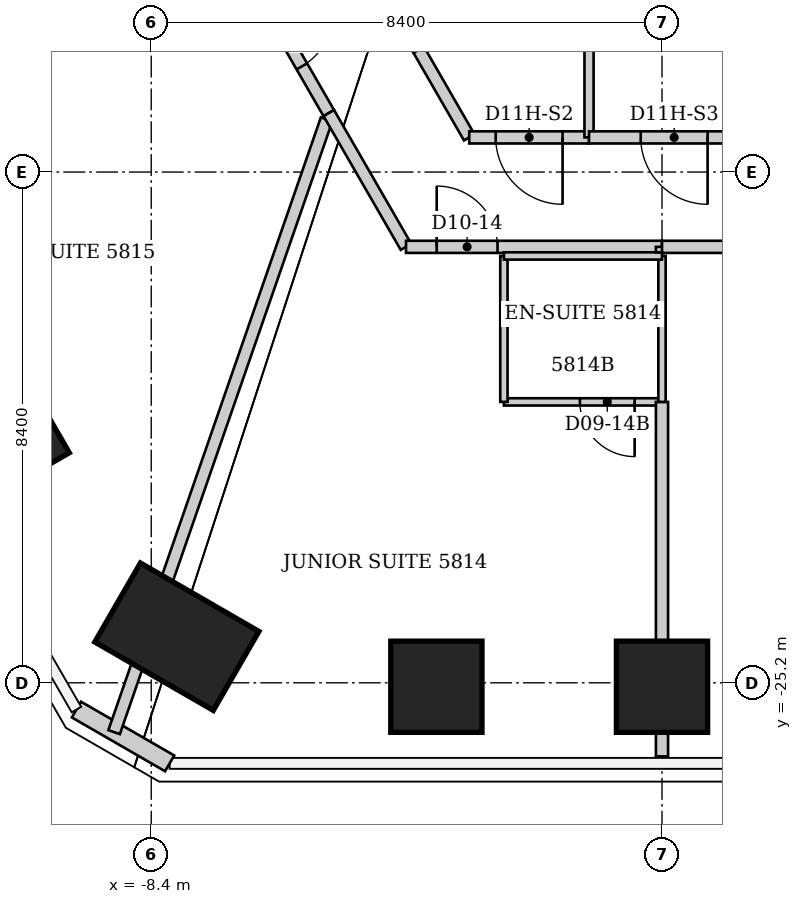
"""IFC4 building model, lengths in metres.
Left out: names, types, materials, properties, quantities, classifications, styles, units other than length and angle.
Written with IfcOpenShell. Run it as: python <this file> out.ifc"""

import sys

from ifc_helpers import new_model, si_unit, direction, frame, frame_2d, origin, origin_2d, place, context, subcontext, project, spatial, rectangle, extrude, element, fill, save


model = new_model("IFC4")
c1 = context("Model", 3, precision=1e-05, world=origin(), true_north=direction((0.0, 1.0)))
c2 = subcontext(c1, "Body", "Model", "MODEL_VIEW")
j1 = project(units=[si_unit("LENGTHUNIT", "METRE"), si_unit("PLANEANGLEUNIT", "RADIAN")], contexts=[c1])
p1 = place(None, origin())
s1 = spatial("IfcSite", under=j1, at=p1, CompositionType="ELEMENT")
p2 = place(p1, origin())
s2 = spatial("IfcBuilding", under=s1, at=p2, CompositionType="ELEMENT")
p3 = place(p2, frame((0.0, 0.0, 232.6)))
s3 = spatial("IfcBuildingStorey", under=s2, at=p3, CompositionType="ELEMENT", Elevation=232.6)
p4 = place(p3, frame((0.0, -25.265, -0.051), z_axis=(0.0, 0.068181275472, 0.997672949255), x_axis=(0.0, -0.997672949255, 0.068181275472)))
e1 = element("IfcColumn", 1, at=p4, inside=s3, PredefinedType="COLUMN", context=c2, shape_type="SweptSolid", body=[
    extrude(rectangle(XDim=1.5, YDim=1.5, at=origin_2d()), origin(), (0.0, 0.0, 1.0), 3.86),
])
p5 = place(p3, frame((-3.71, -25.265, -0.059), z_axis=(0.010036196813, 0.068170393449, 0.997623211544), x_axis=(0.000328953471, -0.99767362936, 0.068170529333)))
e2 = element("IfcColumn", 2, at=p5, inside=s3, PredefinedType="COLUMN", context=c2, shape_type="SweptSolid", body=[
    extrude(rectangle(XDim=1.5, YDim=1.5, at=origin_2d()), origin(), (0.0, 0.0, 1.0), 3.868),
])
p6 = place(p3, frame((-7.979, -24.442, -0.069), z_axis=(0.022031779276, 0.067543140467, 0.997473069751), x_axis=(-0.499490056896, -0.86352686909, 0.069505607122)))
e3 = element("IfcColumn", 3, at=p6, inside=s3, PredefinedType="COLUMN", context=c2, shape_type="SweptSolid", body=[
    extrude(rectangle(XDim=1.5, YDim=2.25, at=origin_2d()), origin(), (0.0, 0.0, 1.0), 3.878),
])
p7 = place(p3, frame((-10.772, -21.142, -0.068), z_axis=(0.029544009484, 0.057954133742, 0.997881991964), x_axis=(-0.86581251094, -0.497389360855, 0.054520818106)))
e4 = element("IfcColumn", 4, at=p7, inside=s3, PredefinedType="COLUMN", context=c2, shape_type="SweptSolid", body=[
    extrude(rectangle(XDim=1.5, YDim=1.5, at=origin_2d()), origin(), (0.0, 0.0, 1.0), 3.876),
])
p8 = place(p3, frame((-8.097, -26.525, 0.0), z_axis=(0.0, 0.0, 1.0), x_axis=(-0.866036293601, 0.499981137809, 0.0)))
e5 = element("IfcWall", 5, at=p8, inside=s3, PredefinedType="SOLIDWALL", context=c2, shape_type="SweptSolid", body=[
    extrude(rectangle(XDim=1.77, YDim=0.3, at=frame_2d((0.885, 0.0))), origin(), (0.0, 0.0, 1.0), 3.64),
])
p9 = place(p3, frame((-9.01, -26.012, 0.0), z_axis=(0.0, 0.0, 1.0), x_axis=(0.327582991606, 0.944822408504, 0.0)))
e6 = element("IfcWall", 6, at=p9, inside=s3, PredefinedType="PARTITIONING", context=c2, shape_type="SweptSolid", body=[
    extrude(rectangle(XDim=10.667, YDim=0.2, at=frame_2d((5.333, 0.0))), origin(), (0.0, 0.0, 1.0), 3.64),
])
p10 = place(p3, frame((-6.865, -13.427, 0.0), z_axis=(0.0, 0.0, 1.0), x_axis=(0.499453176768, -0.866340882226, 0.0)))
e7 = element("IfcWall", 7, at=p10, inside=s3, PredefinedType="PARTITIONING", context=c2, shape_type="SweptSolid", body=[
    extrude(rectangle(XDim=2.773, YDim=0.2, at=frame_2d((1.387, 0.0))), origin(), (0.0, 0.0, 1.0), 3.64),
])
p11 = place(p10, frame((0.887, 0.0, 0.0)))
e8 = element("IfcOpeningElement", 8, at=p11, cuts=e7, PredefinedType="OPENING", context=c2, shape_type="SweptSolid", body=[
    extrude(rectangle(XDim=1.0, YDim=2.13, at=frame_2d((0.5, 1.065))), frame((0.0, 0.1, 0.0), z_axis=(0.0, -1.0, 0.0), x_axis=(1.0, 0.0, 0.0)), (0.0, 0.0, 1.0), 0.2),
])
p12 = place(p3, frame((-5.48, -15.83, 0.0), z_axis=(0.0, 0.0, 1.0), x_axis=(0.499963722229, -0.866046347752, 0.0)))
e9 = element("IfcWall", 9, at=p12, inside=s3, PredefinedType="PARTITIONING", context=c2, shape_type="SweptSolid", body=[
    extrude(rectangle(XDim=2.54, YDim=0.2, at=frame_2d((1.27, 0.0))), origin(), (0.0, 0.0, 1.0), 3.64),
])
p13 = place(p3, frame((-4.21, -18.03, 0.0), z_axis=(0.0, 0.0, 1.0), x_axis=(1.0, 0.0, 0.0)))
e10 = element("IfcWall", 10, at=p13, inside=s3, PredefinedType="PARTITIONING", context=c2, shape_type="SweptSolid", body=[
    extrude(rectangle(XDim=4.21, YDim=0.2, at=frame_2d((2.105, 0.0))), origin(), (0.0, 0.0, 1.0), 3.64),
])
p14 = place(p13, frame((0.505, 0.0, 0.0)))
e11 = element("IfcOpeningElement", 11, at=p14, cuts=e10, PredefinedType="OPENING", context=c2, shape_type="SweptSolid", body=[
    extrude(rectangle(XDim=1.0, YDim=2.13, at=frame_2d((0.5, 1.065))), frame((0.0, 0.1, 0.0), z_axis=(0.0, -1.0, 0.0), x_axis=(1.0, 0.0, 0.0)), (0.0, 0.0, 1.0), 0.2),
])
p15 = place(p3, frame((-4.0, -14.79, 0.0), z_axis=(0.0, 0.0, 1.0), x_axis=(-0.499916512745, 0.866073599808, 0.0)))
e12 = element("IfcWall", 12, at=p15, inside=s3, PredefinedType="PARTITIONING", context=c2, shape_type="SweptSolid", body=[
    extrude(rectangle(XDim=8.821, YDim=0.2, at=frame_2d((4.411, 0.0))), origin(), (0.0, 0.0, 1.0), 3.64),
])
p16 = place(p15, frame((3.861, 0.0, 0.0)))
e13 = element("IfcOpeningElement", 13, at=p16, cuts=e12, PredefinedType="OPENING", context=c2, shape_type="SweptSolid", body=[
    extrude(rectangle(XDim=1.1, YDim=2.2, at=frame_2d((0.55, 1.1))), frame((0.0, 0.1, 0.0), z_axis=(0.0, -1.0, 0.0), x_axis=(1.0, 0.0, 0.0)), (0.0, 0.0, 1.0), 0.2),
])
p17 = place(p3, frame((-3.17, -16.23, 0.0), z_axis=(0.0, 0.0, 1.0), x_axis=(-0.499425709803, 0.866356716594, 0.0)))
e14 = element("IfcWall", 14, at=p17, inside=s3, PredefinedType="PARTITIONING", context=c2, shape_type="SweptSolid", body=[
    extrude(rectangle(XDim=1.662, YDim=0.2, at=frame_2d((0.831, 0.0))), origin(), (0.0, 0.0, 1.0), 3.64),
])
p18 = place(p3, frame((-2.6, -20.58, 0.0), z_axis=(0.0, 0.0, 1.0), x_axis=(1.0, 0.0, 0.0)))
e15 = element("IfcWall", 15, at=p18, inside=s3, PredefinedType="PARTITIONING", context=c2, shape_type="SweptSolid", body=[
    extrude(rectangle(XDim=2.6, YDim=0.12, at=frame_2d((1.3, 0.0))), origin(), (0.0, 0.0, 1.0), 3.64),
])
p19 = place(p18, frame((1.25, 0.0, 0.0)))
e16 = element("IfcOpeningElement", 16, at=p19, cuts=e15, PredefinedType="OPENING", context=c2, shape_type="SweptSolid", body=[
    extrude(rectangle(XDim=0.9, YDim=2.03, at=frame_2d((0.45, 1.015))), frame((0.0, 0.06, 0.0), z_axis=(0.0, -1.0, 0.0), x_axis=(1.0, 0.0, 0.0)), (0.0, 0.0, 1.0), 0.12),
])
p20 = place(p3, frame((-2.6, -18.18, 0.0), z_axis=(0.0, 0.0, 1.0), x_axis=(0.0, -1.0, 0.0)))
e17 = element("IfcWall", 17, at=p20, inside=s3, PredefinedType="PARTITIONING", context=c2, shape_type="SweptSolid", body=[
    extrude(rectangle(XDim=2.4, YDim=0.12, at=frame_2d((1.2, 0.0))), origin(), (0.0, 0.0, 1.0), 3.64),
])
p21 = place(p3, frame((-1.2, -16.23, 0.0), z_axis=(0.0, 0.0, 1.0), x_axis=(-1.0, 0.0, 0.0)))
e18 = element("IfcWall", 18, at=p21, inside=s3, PredefinedType="PARTITIONING", context=c2, shape_type="SweptSolid", body=[
    extrude(rectangle(XDim=1.97, YDim=0.2, at=frame_2d((0.985, 0.0))), origin(), (0.0, 0.0, 1.0), 3.64),
])
p22 = place(p21, frame((0.435, 0.0, 0.0)))
e19 = element("IfcOpeningElement", 19, at=p22, cuts=e18, PredefinedType="OPENING", context=c2, shape_type="SweptSolid", body=[
    extrude(rectangle(XDim=1.1, YDim=2.2, at=frame_2d((0.55, 1.1))), frame((0.0, 0.1, 0.0), z_axis=(0.0, -1.0, 0.0), x_axis=(1.0, 0.0, 0.0)), (0.0, 0.0, 1.0), 0.2),
])
p23 = place(p3, frame((-1.2, -7.1, 0.0), z_axis=(0.0, 0.0, 1.0), x_axis=(0.0, -1.0, 0.0)))
e20 = element("IfcWall", 20, at=p23, inside=s3, PredefinedType="PARTITIONING", context=c2, shape_type="SweptSolid", body=[
    extrude(rectangle(XDim=9.13, YDim=0.15, at=frame_2d((4.565, 0.0))), origin(), (0.0, 0.0, 1.0), 3.64),
])
p24 = place(p3, frame((0.0, -26.41, 0.0), z_axis=(0.0, 0.0, 1.0), x_axis=(0.0, 1.0, 0.0)))
e21 = element("IfcWall", 21, at=p24, inside=s3, PredefinedType="PARTITIONING", context=c2, shape_type="SweptSolid", body=[
    extrude(rectangle(XDim=5.83, YDim=0.2, at=frame_2d((2.915, 0.0))), origin(), (0.0, 0.0, 1.0), 2.726),
])
p25 = place(p3, frame((0.0, -20.58, 0.0), z_axis=(0.0, 0.0, 1.0), x_axis=(0.0, 1.0, 0.0)))
e22 = element("IfcWall", 22, at=p25, inside=s3, PredefinedType="PARTITIONING", context=c2, shape_type="SweptSolid", body=[
    extrude(rectangle(XDim=2.4, YDim=0.12, at=frame_2d((1.2, 0.0))), origin(), (0.0, 0.0, 1.0), 2.726),
])
p26 = place(p3, frame((0.0, -18.18, 0.0), z_axis=(0.0, 0.0, 1.0), x_axis=(-1.0, 0.0, 0.0)))
e23 = element("IfcWall", 23, at=p26, inside=s3, PredefinedType="PARTITIONING", context=c2, shape_type="SweptSolid", body=[
    extrude(rectangle(XDim=2.6, YDim=0.12, at=frame_2d((1.3, 0.0))), origin(), (0.0, 0.0, 1.0), 3.64),
])
p27 = place(p3, frame((0.0, -18.12, 0.0), z_axis=(0.0, 0.0, 1.0), x_axis=(0.0, 1.0, 0.0)))
e24 = element("IfcWall", 24, at=p27, inside=s3, PredefinedType="PARTITIONING", context=c2, shape_type="SweptSolid", body=[
    extrude(rectangle(XDim=0.09, YDim=0.2, at=frame_2d((0.045, 0.0))), origin(), (0.0, 0.0, 1.0), 3.64),
])
p28 = place(p3, frame((0.0, -18.03, 0.0), z_axis=(0.0, 0.0, 1.0), x_axis=(1.0, 0.0, 0.0)))
e25 = element("IfcWall", 25, at=p28, inside=s3, PredefinedType="PARTITIONING", context=c2, shape_type="SweptSolid", body=[
    extrude(rectangle(XDim=4.21, YDim=0.2, at=frame_2d((2.105, 0.0))), origin(), (0.0, 0.0, 1.0), 3.64),
])
p29 = place(p28, frame((1.605, 0.0, 0.0)))
e26 = element("IfcOpeningElement", 26, at=p29, cuts=e25, PredefinedType="OPENING", context=c2, shape_type="SweptSolid", body=[
    extrude(rectangle(XDim=1.0, YDim=2.13, at=frame_2d((0.5, 1.065))), frame((0.0, 0.1, 0.0), z_axis=(0.0, -1.0, 0.0), x_axis=(1.0, 0.0, 0.0)), (0.0, 0.0, 1.0), 0.2),
])
p30 = place(p3, frame((1.6, -16.23, 0.0), z_axis=(0.0, 0.0, 1.0), x_axis=(-1.0, 0.0, 0.0)))
e27 = element("IfcWall", 27, at=p30, inside=s3, PredefinedType="PARTITIONING", context=c2, shape_type="SweptSolid", body=[
    extrude(rectangle(XDim=2.8, YDim=0.2, at=frame_2d((1.4, 0.0))), origin(), (0.0, 0.0, 1.0), 3.64),
])
p31 = place(p30, frame((0.85, 0.0, 0.0)))
e28 = element("IfcOpeningElement", 28, at=p31, cuts=e27, PredefinedType="OPENING", context=c2, shape_type="SweptSolid", body=[
    extrude(rectangle(XDim=1.1, YDim=2.2, at=frame_2d((0.55, 1.1))), frame((0.0, 0.1, 0.0), z_axis=(0.0, -1.0, 0.0), x_axis=(1.0, 0.0, 0.0)), (0.0, 0.0, 1.0), 0.2),
])
p32 = place(p14, origin())
e29 = element("IfcDoor", 29, at=p32, inside=s3, OperationType="SINGLE_SWING_LEFT", PredefinedType="DOOR", context=c2, shape_type="SweptSolid", body=[
    extrude(rectangle(XDim=1.0, YDim=2.13, at=frame_2d((0.5, 1.065))), frame((0.0, 0.025, 0.0), z_axis=(0.0, -1.0, 0.0), x_axis=(1.0, 0.0, 0.0)), (0.0, 0.0, 1.0), 0.05),
])
fill(e11, e29)
p33 = place(p19, origin())
e30 = element("IfcDoor", 30, at=p33, inside=s3, OperationType="SINGLE_SWING_RIGHT", PredefinedType="DOOR", context=c2, shape_type="SweptSolid", body=[
    extrude(rectangle(XDim=0.9, YDim=2.03, at=frame_2d((0.45, 1.015))), frame((0.0, 0.025, 0.0), z_axis=(0.0, -1.0, 0.0), x_axis=(1.0, 0.0, 0.0)), (0.0, 0.0, 1.0), 0.05),
])
fill(e16, e30)
p34 = place(p11, origin())
e31 = element("IfcDoor", 31, at=p34, inside=s3, OperationType="SINGLE_SWING_LEFT", PredefinedType="DOOR", context=c2, shape_type="SweptSolid", body=[
    extrude(rectangle(XDim=1.0, YDim=2.13, at=frame_2d((0.5, 1.065))), frame((0.0, 0.025, 0.0), z_axis=(0.0, -1.0, 0.0), x_axis=(1.0, 0.0, 0.0)), (0.0, 0.0, 1.0), 0.05),
])
fill(e8, e31)
p35 = place(p22, origin())
e32 = element("IfcDoor", 32, at=p35, inside=s3, OperationType="SINGLE_SWING_LEFT", PredefinedType="DOOR", context=c2, shape_type="SweptSolid", body=[
    extrude(rectangle(XDim=1.1, YDim=2.2, at=frame_2d((0.55, 1.1))), frame((0.0, 0.025, 0.0), z_axis=(0.0, -1.0, 0.0), x_axis=(1.0, 0.0, 0.0)), (0.0, 0.0, 1.0), 0.05),
])
fill(e19, e32)
p36 = place(p31, origin())
e33 = element("IfcDoor", 33, at=p36, inside=s3, OperationType="SINGLE_SWING_LEFT", PredefinedType="DOOR", context=c2, shape_type="SweptSolid", body=[
    extrude(rectangle(XDim=1.1, YDim=2.2, at=frame_2d((0.55, 1.1))), frame((0.0, 0.025, 0.0), z_axis=(0.0, -1.0, 0.0), x_axis=(1.0, 0.0, 0.0)), (0.0, 0.0, 1.0), 0.05),
])
fill(e28, e33)
save(model, sys.argv[1])
